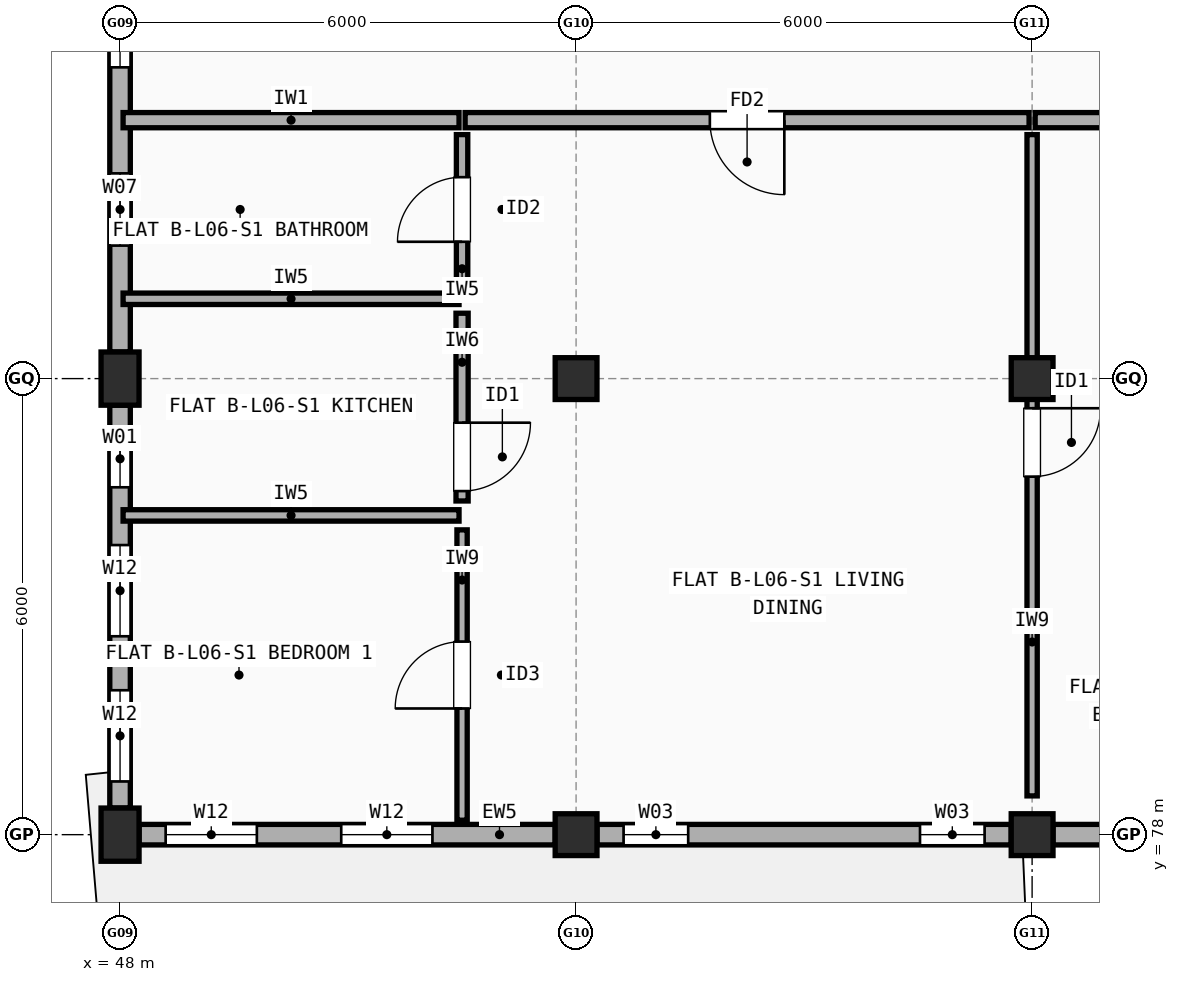
"""IFC4 building model, lengths in metres.
Left out: names, types, materials, properties, quantities, classifications, styles, units other than length and angle.
Written with IfcOpenShell. Run it as: python <this file> out.ifc"""

import sys

from ifc_helpers import new_model, si_unit, direction, frame, frame_2d, origin, origin_2d, place, context, subcontext, project, spatial, rectangle, extrude, element, fill, save


model = new_model("IFC4")
c1 = context("Model", 3, precision=1e-05, world=origin(), true_north=direction((0.0, 1.0)))
c2 = subcontext(c1, "Body", "Model", "MODEL_VIEW")
j1 = project(units=[si_unit("LENGTHUNIT", "METRE"), si_unit("PLANEANGLEUNIT", "RADIAN")], contexts=[c1])
p1 = place(None, origin())
s1 = spatial("IfcSite", under=j1, at=p1, CompositionType="ELEMENT")
p2 = place(p1, origin())
s2 = spatial("IfcBuilding", under=s1, at=p2, CompositionType="ELEMENT")
p3 = place(p2, frame((0.0, 0.0, 20.5)))
s3 = spatial("IfcBuildingStorey", under=s2, at=p3, CompositionType="ELEMENT", Elevation=20.5)
for number, where, z_axis, x_axis in (
    (1, (48.0, 78.0, 0.0), (0.0, 0.0, 1.0), (1.0, 0.0, 0.0)),
    (2, (48.0, 84.0, 0.0), (0.0, 0.0, 1.0), (1.0, 0.0, 0.0)),
):
    element("IfcColumn", number, at=place(p3, frame(where, z_axis=z_axis, x_axis=x_axis)), inside=s3, PredefinedType="COLUMN", context=c2, shape_type="SweptSolid", body=[
        extrude(rectangle(XDim=0.5, YDim=0.7, at=origin_2d()), origin(), (0.0, 0.0, 1.0), 2.97),
    ])
for number, where, z_axis, x_axis in (
    (3, (54.0, 78.0, 0.0), (0.0, 0.0, 1.0), (1.0, 0.0, 0.0)),
    (4, (54.0, 84.0, 0.0), (0.0, 0.0, 1.0), (1.0, 0.0, 0.0)),
    (5, (60.0, 78.0, 0.0), (0.0, 0.0, 1.0), (1.0, 0.0, 0.0)),
    (6, (60.0, 84.0, 0.0), (0.0, 0.0, 1.0), (1.0, 0.0, 0.0)),
):
    element("IfcColumn", number, at=place(p3, frame(where, z_axis=z_axis, x_axis=x_axis)), inside=s3, PredefinedType="COLUMN", context=c2, shape_type="SweptSolid", body=[
        extrude(rectangle(XDim=0.55, YDim=0.55, at=origin_2d()), origin(), (0.0, 0.0, 1.0), 2.97),
    ])
p4 = place(p3, frame((48.25, 78.0, 0.0), z_axis=(0.0, 0.0, 1.0), x_axis=(1.0, 0.0, 0.0)))
e7 = element("IfcWall", 7, at=p4, inside=s3, PredefinedType="STANDARD", context=c2, shape_type="SweptSolid", body=[
    extrude(rectangle(XDim=5.475, YDim=0.27, at=frame_2d((2.738, 0.0))), origin(), (0.0, 0.0, 1.0), 2.452),
])
p5 = place(p4, frame((0.35, 0.0, 0.9)))
e8 = element("IfcOpeningElement", 8, at=p5, cuts=e7, PredefinedType="OPENING", context=c2, shape_type="SweptSolid", body=[
    extrude(rectangle(XDim=1.2, YDim=1.35, at=frame_2d((0.6, 0.675))), frame((0.0, 0.145, 0.0), z_axis=(0.0, -1.0, 0.0), x_axis=(1.0, 0.0, 0.0)), (0.0, 0.0, 1.0), 0.29),
])
p6 = place(p4, frame((2.66, 0.0, 0.9)))
e9 = element("IfcOpeningElement", 9, at=p6, cuts=e7, PredefinedType="OPENING", context=c2, shape_type="SweptSolid", body=[
    extrude(rectangle(XDim=1.2, YDim=1.35, at=frame_2d((0.6, 0.675))), frame((0.0, 0.145, 0.0), z_axis=(0.0, -1.0, 0.0), x_axis=(1.0, 0.0, 0.0)), (0.0, 0.0, 1.0), 0.29),
])
p7 = place(p3, frame((54.275, 78.0, 0.0), z_axis=(0.0, 0.0, 1.0), x_axis=(1.0, 0.0, 0.0)))
e10 = element("IfcWall", 10, at=p7, inside=s3, PredefinedType="STANDARD", context=c2, shape_type="SweptSolid", body=[
    extrude(rectangle(XDim=5.45, YDim=0.27, at=frame_2d((2.725, 0.0))), origin(), (0.0, 0.0, 1.0), 2.452),
])
p8 = place(p7, frame((0.35, 0.0, 0.9)))
e11 = element("IfcOpeningElement", 11, at=p8, cuts=e10, PredefinedType="OPENING", context=c2, shape_type="SweptSolid", body=[
    extrude(rectangle(XDim=0.85, YDim=1.25, at=frame_2d((0.425, 0.625))), frame((0.0, 0.145, 0.0), z_axis=(0.0, -1.0, 0.0), x_axis=(1.0, 0.0, 0.0)), (0.0, 0.0, 1.0), 0.29),
])
p9 = place(p7, frame((4.25, 0.0, 0.9)))
e12 = element("IfcOpeningElement", 12, at=p9, cuts=e10, PredefinedType="OPENING", context=c2, shape_type="SweptSolid", body=[
    extrude(rectangle(XDim=0.85, YDim=1.25, at=frame_2d((0.425, 0.625))), frame((0.0, 0.145, 0.0), z_axis=(0.0, -1.0, 0.0), x_axis=(1.0, 0.0, 0.0)), (0.0, 0.0, 1.0), 0.29),
])
p10 = place(p3, frame((60.275, 78.0, 0.0), z_axis=(0.0, 0.0, 1.0), x_axis=(1.0, 0.0, 0.0)))
e13 = element("IfcWall", 13, at=p10, inside=s3, PredefinedType="STANDARD", context=c2, shape_type="SweptSolid", body=[
    extrude(rectangle(XDim=5.45, YDim=0.27, at=frame_2d((2.725, 0.0))), origin(), (0.0, 0.0, 1.0), 2.452),
])
p11 = place(p10, frame((0.867, 0.0, 0.9)))
e14 = element("IfcOpeningElement", 14, at=p11, cuts=e13, PredefinedType="OPENING", context=c2, shape_type="SweptSolid", body=[
    extrude(rectangle(XDim=0.95, YDim=1.35, at=frame_2d((0.475, 0.675))), frame((0.0, 0.145, 0.0), z_axis=(0.0, -1.0, 0.0), x_axis=(1.0, 0.0, 0.0)), (0.0, 0.0, 1.0), 0.29),
])
p12 = place(p10, frame((3.583, 0.0, 0.9)))
e15 = element("IfcOpeningElement", 15, at=p12, cuts=e13, PredefinedType="OPENING", context=c2, shape_type="SweptSolid", body=[
    extrude(rectangle(XDim=1.05, YDim=1.35, at=frame_2d((0.525, 0.675))), frame((0.0, 0.145, 0.0), z_axis=(0.0, -1.0, 0.0), x_axis=(1.0, 0.0, 0.0)), (0.0, 0.0, 1.0), 0.29),
])
p13 = place(p3, frame((48.0, 89.65, 0.0), z_axis=(0.0, 0.0, 1.0), x_axis=(0.0, -1.0, 0.0)))
e16 = element("IfcWall", 16, at=p13, inside=s3, PredefinedType="STANDARD", context=c2, shape_type="SweptSolid", body=[
    extrude(rectangle(XDim=5.3, YDim=0.27, at=frame_2d((2.65, 0.0))), origin(), (0.0, 0.0, 1.0), 2.452),
])
p14 = place(p13, frame((0.655, 0.0, 0.9)))
e17 = element("IfcOpeningElement", 17, at=p14, cuts=e16, PredefinedType="OPENING", context=c2, shape_type="SweptSolid", body=[
    extrude(rectangle(XDim=0.9, YDim=1.3, at=frame_2d((0.45, 0.65))), frame((0.0, 0.145, 0.0), z_axis=(0.0, -1.0, 0.0), x_axis=(1.0, 0.0, 0.0)), (0.0, 0.0, 1.0), 0.29),
])
p15 = place(p13, frame((2.95, 0.0, 0.9)))
e18 = element("IfcOpeningElement", 18, at=p15, cuts=e16, PredefinedType="OPENING", context=c2, shape_type="SweptSolid", body=[
    extrude(rectangle(XDim=0.95, YDim=1.35, at=frame_2d((0.475, 0.675))), frame((0.0, 0.145, 0.0), z_axis=(0.0, -1.0, 0.0), x_axis=(1.0, 0.0, 0.0)), (0.0, 0.0, 1.0), 0.29),
])
p16 = place(p3, frame((48.0, 83.65, 0.0), z_axis=(0.0, 0.0, 1.0), x_axis=(0.0, -1.0, 0.0)))
e19 = element("IfcWall", 19, at=p16, inside=s3, PredefinedType="STANDARD", context=c2, shape_type="SweptSolid", body=[
    extrude(rectangle(XDim=5.3, YDim=0.27, at=frame_2d((2.65, 0.0))), origin(), (0.0, 0.0, 1.0), 2.452),
])
p17 = place(p16, frame((0.33, 0.0, 0.9)))
e20 = element("IfcOpeningElement", 20, at=p17, cuts=e19, PredefinedType="OPENING", context=c2, shape_type="SweptSolid", body=[
    extrude(rectangle(XDim=0.75, YDim=1.15, at=frame_2d((0.375, 0.575))), frame((0.0, 0.145, 0.0), z_axis=(0.0, -1.0, 0.0), x_axis=(1.0, 0.0, 0.0)), (0.0, 0.0, 1.0), 0.29),
])
p18 = place(p16, frame((1.84, 0.0, 0.9)))
e21 = element("IfcOpeningElement", 21, at=p18, cuts=e19, PredefinedType="OPENING", context=c2, shape_type="SweptSolid", body=[
    extrude(rectangle(XDim=1.2, YDim=1.35, at=frame_2d((0.6, 0.675))), frame((0.0, 0.145, 0.0), z_axis=(0.0, -1.0, 0.0), x_axis=(1.0, 0.0, 0.0)), (0.0, 0.0, 1.0), 0.29),
])
p19 = place(p16, frame((3.75, 0.0, 0.9)))
e22 = element("IfcOpeningElement", 22, at=p19, cuts=e19, PredefinedType="OPENING", context=c2, shape_type="SweptSolid", body=[
    extrude(rectangle(XDim=1.2, YDim=1.35, at=frame_2d((0.6, 0.675))), frame((0.0, 0.145, 0.0), z_axis=(0.0, -1.0, 0.0), x_axis=(1.0, 0.0, 0.0)), (0.0, 0.0, 1.0), 0.29),
])
p20 = place(p3, frame((48.04, 87.4, 0.0), z_axis=(0.0, 0.0, 1.0), x_axis=(1.0, 0.0, 0.0)))
e23 = element("IfcWall", 23, at=p20, inside=s3, PredefinedType="SOLIDWALL", context=c2, shape_type="SweptSolid", body=[
    extrude(rectangle(XDim=4.42, YDim=0.2, at=frame_2d((2.21, 0.0))), origin(), (0.0, 0.0, 1.0), 2.452),
])
p21 = place(p3, frame((52.54, 87.4, 0.0), z_axis=(0.0, 0.0, 1.0), x_axis=(1.0, 0.0, 0.0)))
e24 = element("IfcWall", 24, at=p21, inside=s3, PredefinedType="SOLIDWALL", context=c2, shape_type="SweptSolid", body=[
    extrude(rectangle(XDim=7.42, YDim=0.2, at=frame_2d((3.71, 0.0))), origin(), (0.0, 0.0, 1.0), 2.458),
])
p22 = place(p21, frame((3.22, 0.0, 0.0)))
e25 = element("IfcOpeningElement", 25, at=p22, cuts=e24, PredefinedType="OPENING", context=c2, shape_type="SweptSolid", body=[
    extrude(rectangle(XDim=0.98, YDim=2.15, at=frame_2d((0.49, 1.075))), frame((0.0, 0.11, 0.0), z_axis=(0.0, -1.0, 0.0), x_axis=(1.0, 0.0, 0.0)), (0.0, 0.0, 1.0), 0.22),
])
p23 = place(p3, frame((52.5, 78.19, 0.0), z_axis=(0.0, 0.0, 1.0), x_axis=(0.0, 1.0, 0.0)))
e26 = element("IfcWall", 26, at=p23, inside=s3, PredefinedType="PARTITIONING", context=c2, shape_type="SweptSolid", body=[
    extrude(rectangle(XDim=3.82, YDim=0.135, at=frame_2d((1.91, 0.0))), origin(), (0.0, 0.0, 1.0), 2.97),
])
p24 = place(p23, frame((1.47, 0.0, 0.0)))
e27 = element("IfcOpeningElement", 27, at=p24, cuts=e26, PredefinedType="OPENING", context=c2, shape_type="SweptSolid", body=[
    extrude(rectangle(XDim=0.88, YDim=2.1, at=frame_2d((0.44, 1.05))), frame((0.0, 0.077, 0.0), z_axis=(0.0, -1.0, 0.0), x_axis=(1.0, 0.0, 0.0)), (0.0, 0.0, 1.0), 0.155),
])
p25 = place(p3, frame((52.5, 82.39, 0.0), z_axis=(0.0, 0.0, 1.0), x_axis=(0.0, 1.0, 0.0)))
e28 = element("IfcWall", 28, at=p25, inside=s3, PredefinedType="PLUMBINGWALL", context=c2, shape_type="SweptSolid", body=[
    extrude(rectangle(XDim=2.47, YDim=0.16, at=frame_2d((1.235, 0.0))), origin(), (0.0, 0.0, 1.0), 2.452),
])
p26 = place(p25, frame((0.13, 0.0, 0.0)))
e29 = element("IfcOpeningElement", 29, at=p26, cuts=e28, PredefinedType="OPENING", context=c2, shape_type="SweptSolid", body=[
    extrude(rectangle(XDim=0.9, YDim=2.1, at=frame_2d((0.45, 1.05))), frame((0.0, 0.09, 0.0), z_axis=(0.0, -1.0, 0.0), x_axis=(1.0, 0.0, 0.0)), (0.0, 0.0, 1.0), 0.18),
])
p27 = place(p3, frame((52.5, 85.24, 0.0), z_axis=(0.0, 0.0, 1.0), x_axis=(0.0, 1.0, 0.0)))
e30 = element("IfcWall", 30, at=p27, inside=s3, PredefinedType="PARTITIONING", context=c2, shape_type="SweptSolid", body=[
    extrude(rectangle(XDim=1.97, YDim=0.15, at=frame_2d((0.985, 0.0))), origin(), (0.0, 0.0, 1.0), 2.97),
])
p28 = place(p27, frame((0.56, 0.0, 0.0)))
e31 = element("IfcOpeningElement", 31, at=p28, cuts=e30, PredefinedType="OPENING", context=c2, shape_type="SweptSolid", body=[
    extrude(rectangle(XDim=0.85, YDim=2.1, at=frame_2d((0.425, 1.05))), frame((0.0, 0.085, 0.0), z_axis=(0.0, -1.0, 0.0), x_axis=(1.0, 0.0, 0.0)), (0.0, 0.0, 1.0), 0.17),
])
for number, where, z_axis, x_axis in (
    (32, (48.04, 82.2, 0.0), (0.0, 0.0, 1.0), (1.0, 0.0, 0.0)),
    (33, (48.04, 85.05, 0.0), (0.0, 0.0, 1.0), (1.0, 0.0, 0.0)),
):
    element("IfcWall", number, at=place(p3, frame(where, z_axis=z_axis, x_axis=x_axis)), inside=s3, PredefinedType="PARTITIONING", context=c2, shape_type="SweptSolid", body=[
        extrude(rectangle(XDim=4.42, YDim=0.15, at=frame_2d((2.21, 0.0))), origin(), (0.0, 0.0, 1.0), 2.452),
    ])
p29 = place(p3, frame((60.04, 87.4, 0.0), z_axis=(0.0, 0.0, 1.0), x_axis=(1.0, 0.0, 0.0)))
e34 = element("IfcWall", 34, at=p29, inside=s3, PredefinedType="SOLIDWALL", context=c2, shape_type="SweptSolid", body=[
    extrude(rectangle(XDim=2.92, YDim=0.2, at=frame_2d((1.46, 0.0))), origin(), (0.0, 0.0, 1.0), 2.548),
])
p30 = place(p3, frame((60.0, 78.51, 0.0), z_axis=(0.0, 0.0, 1.0), x_axis=(0.0, 1.0, 0.0)))
e35 = element("IfcWall", 35, at=p30, inside=s3, PredefinedType="PARTITIONING", context=c2, shape_type="SweptSolid", body=[
    extrude(rectangle(XDim=8.7, YDim=0.135, at=frame_2d((4.35, 0.0))), origin(), (0.0, 0.0, 1.0), 2.458),
])
p31 = place(p30, frame((4.2, 0.0, 0.0)))
e36 = element("IfcOpeningElement", 36, at=p31, cuts=e35, PredefinedType="OPENING", context=c2, shape_type="SweptSolid", body=[
    extrude(rectangle(XDim=0.9, YDim=2.1, at=frame_2d((0.45, 1.05))), frame((0.0, 0.077, 0.0), z_axis=(0.0, -1.0, 0.0), x_axis=(1.0, 0.0, 0.0)), (0.0, 0.0, 1.0), 0.155),
])
p32 = place(p5, origin())
e37 = element("IfcWindow", 37, at=p32, inside=s3, PartitioningType="SINGLE_PANEL", PredefinedType="WINDOW", context=c2, shape_type="SweptSolid", body=[
    extrude(rectangle(XDim=1.2, YDim=1.35, at=frame_2d((0.6, 0.675))), frame((0.0, 0.03, 0.0), z_axis=(0.0, -1.0, 0.0), x_axis=(1.0, 0.0, 0.0)), (0.0, 0.0, 1.0), 0.06),
])
fill(e8, e37)
p33 = place(p6, origin())
e38 = element("IfcWindow", 38, at=p33, inside=s3, PartitioningType="SINGLE_PANEL", PredefinedType="WINDOW", context=c2, shape_type="SweptSolid", body=[
    extrude(rectangle(XDim=1.2, YDim=1.35, at=frame_2d((0.6, 0.675))), frame((0.0, 0.03, 0.0), z_axis=(0.0, -1.0, 0.0), x_axis=(1.0, 0.0, 0.0)), (0.0, 0.0, 1.0), 0.06),
])
fill(e9, e38)
p34 = place(p8, origin())
e39 = element("IfcWindow", 39, at=p34, inside=s3, PartitioningType="SINGLE_PANEL", PredefinedType="WINDOW", context=c2, shape_type="SweptSolid", body=[
    extrude(rectangle(XDim=0.85, YDim=1.25, at=frame_2d((0.425, 0.625))), frame((0.0, 0.03, 0.0), z_axis=(0.0, -1.0, 0.0), x_axis=(1.0, 0.0, 0.0)), (0.0, 0.0, 1.0), 0.06),
])
fill(e11, e39)
p35 = place(p9, origin())
e40 = element("IfcWindow", 40, at=p35, inside=s3, PartitioningType="SINGLE_PANEL", PredefinedType="WINDOW", context=c2, shape_type="SweptSolid", body=[
    extrude(rectangle(XDim=0.85, YDim=1.25, at=frame_2d((0.425, 0.625))), frame((0.0, 0.03, 0.0), z_axis=(0.0, -1.0, 0.0), x_axis=(1.0, 0.0, 0.0)), (0.0, 0.0, 1.0), 0.06),
])
fill(e12, e40)
p36 = place(p14, origin())
e41 = element("IfcWindow", 41, at=p36, inside=s3, PartitioningType="SINGLE_PANEL", PredefinedType="WINDOW", context=c2, shape_type="SweptSolid", body=[
    extrude(rectangle(XDim=0.9, YDim=1.3, at=frame_2d((0.45, 0.65))), frame((0.0, 0.03, 0.0), z_axis=(0.0, -1.0, 0.0), x_axis=(1.0, 0.0, 0.0)), (0.0, 0.0, 1.0), 0.06),
])
fill(e17, e41)
p37 = place(p15, origin())
e42 = element("IfcWindow", 42, at=p37, inside=s3, PartitioningType="SINGLE_PANEL", PredefinedType="WINDOW", context=c2, shape_type="SweptSolid", body=[
    extrude(rectangle(XDim=0.95, YDim=1.35, at=frame_2d((0.475, 0.675))), frame((0.0, 0.03, 0.0), z_axis=(0.0, -1.0, 0.0), x_axis=(1.0, 0.0, 0.0)), (0.0, 0.0, 1.0), 0.06),
])
fill(e18, e42)
p38 = place(p17, origin())
e43 = element("IfcWindow", 43, at=p38, inside=s3, PartitioningType="SINGLE_PANEL", PredefinedType="WINDOW", context=c2, shape_type="SweptSolid", body=[
    extrude(rectangle(XDim=0.75, YDim=1.15, at=frame_2d((0.375, 0.575))), frame((0.0, 0.03, 0.0), z_axis=(0.0, -1.0, 0.0), x_axis=(1.0, 0.0, 0.0)), (0.0, 0.0, 1.0), 0.06),
])
fill(e20, e43)
p39 = place(p18, origin())
e44 = element("IfcWindow", 44, at=p39, inside=s3, PartitioningType="SINGLE_PANEL", PredefinedType="WINDOW", context=c2, shape_type="SweptSolid", body=[
    extrude(rectangle(XDim=1.2, YDim=1.35, at=frame_2d((0.6, 0.675))), frame((0.0, 0.03, 0.0), z_axis=(0.0, -1.0, 0.0), x_axis=(1.0, 0.0, 0.0)), (0.0, 0.0, 1.0), 0.06),
])
fill(e21, e44)
p40 = place(p19, origin())
e45 = element("IfcWindow", 45, at=p40, inside=s3, PartitioningType="SINGLE_PANEL", PredefinedType="WINDOW", context=c2, shape_type="SweptSolid", body=[
    extrude(rectangle(XDim=1.2, YDim=1.35, at=frame_2d((0.6, 0.675))), frame((0.0, 0.03, 0.0), z_axis=(0.0, -1.0, 0.0), x_axis=(1.0, 0.0, 0.0)), (0.0, 0.0, 1.0), 0.06),
])
fill(e22, e45)
p41 = place(p22, origin())
e46 = element("IfcDoor", 46, at=p41, inside=s3, OperationType="SINGLE_SWING_RIGHT", PredefinedType="DOOR", context=c2, shape_type="SweptSolid", body=[
    extrude(rectangle(XDim=0.98, YDim=2.15, at=frame_2d((0.49, 1.075))), frame((0.0, 0.025, 0.0), z_axis=(0.0, -1.0, 0.0), x_axis=(1.0, 0.0, 0.0)), (0.0, 0.0, 1.0), 0.05),
])
fill(e25, e46)
p42 = place(p24, origin())
e47 = element("IfcDoor", 47, at=p42, inside=s3, OperationType="SINGLE_SWING_LEFT", PredefinedType="DOOR", context=c2, shape_type="SweptSolid", body=[
    extrude(rectangle(XDim=0.88, YDim=2.1, at=frame_2d((0.44, 1.05))), frame((0.0, 0.025, 0.0), z_axis=(0.0, -1.0, 0.0), x_axis=(1.0, 0.0, 0.0)), (0.0, 0.0, 1.0), 0.05),
])
fill(e27, e47)
p43 = place(p26, origin())
e48 = element("IfcDoor", 48, at=p43, inside=s3, OperationType="SINGLE_SWING_RIGHT", PredefinedType="DOOR", context=c2, shape_type="SweptSolid", body=[
    extrude(rectangle(XDim=0.9, YDim=2.1, at=frame_2d((0.45, 1.05))), frame((0.0, 0.025, 0.0), z_axis=(0.0, -1.0, 0.0), x_axis=(1.0, 0.0, 0.0)), (0.0, 0.0, 1.0), 0.05),
])
fill(e29, e48)
p44 = place(p28, origin())
e49 = element("IfcDoor", 49, at=p44, inside=s3, OperationType="SINGLE_SWING_LEFT", PredefinedType="DOOR", context=c2, shape_type="SweptSolid", body=[
    extrude(rectangle(XDim=0.85, YDim=2.1, at=frame_2d((0.425, 1.05))), frame((0.0, 0.025, 0.0), z_axis=(0.0, -1.0, 0.0), x_axis=(1.0, 0.0, 0.0)), (0.0, 0.0, 1.0), 0.05),
])
fill(e31, e49)
p45 = place(p31, origin())
e50 = element("IfcDoor", 50, at=p45, inside=s3, OperationType="SINGLE_SWING_RIGHT", PredefinedType="DOOR", context=c2, shape_type="SweptSolid", body=[
    extrude(rectangle(XDim=0.9, YDim=2.1, at=frame_2d((0.45, 1.05))), frame((0.0, 0.025, 0.0), z_axis=(0.0, -1.0, 0.0), x_axis=(1.0, 0.0, 0.0)), (0.0, 0.0, 1.0), 0.05),
])
fill(e36, e50)
save(model, sys.argv[1])
